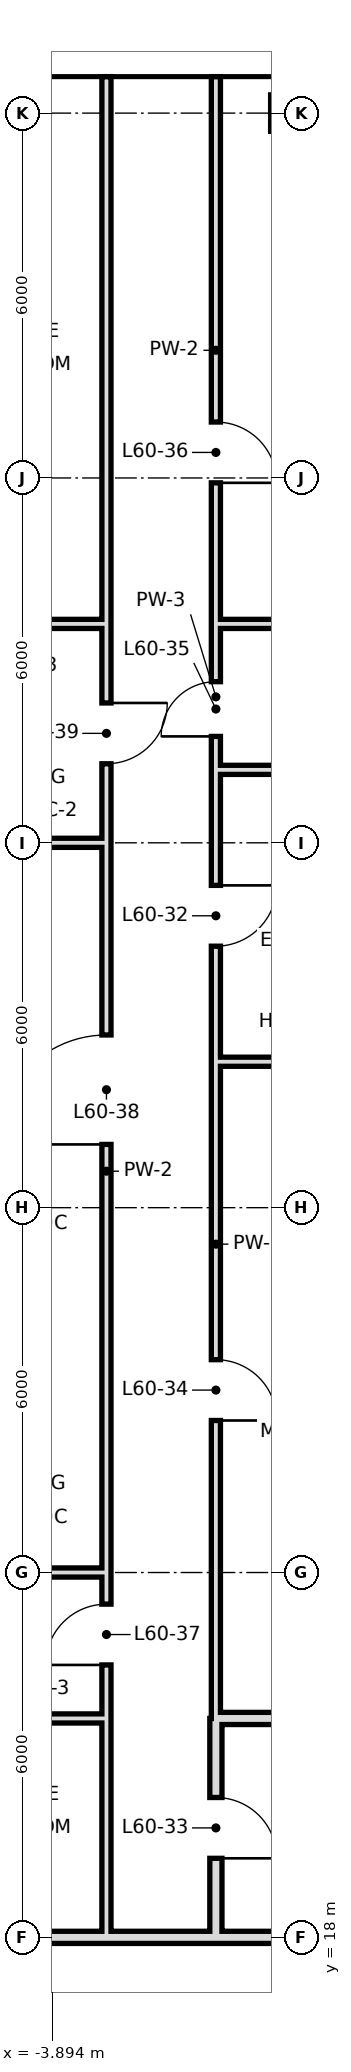
"""IFC4 building model, lengths in metres.
Left out: names, types, materials, properties, quantities, classifications, styles, units other than length and angle.
Written with IfcOpenShell. Run it as: python <this file> out.ifc"""

import sys

from ifc_helpers import new_model, si_unit, direction, frame, frame_2d, origin, place, context, subcontext, project, spatial, rectangle, extrude, element, fill, save


model = new_model("IFC4")
c1 = context("Model", 3, precision=1e-05, world=origin(), true_north=direction((0.0, 1.0)))
c2 = subcontext(c1, "Body", "Model", "MODEL_VIEW")
j1 = project(units=[si_unit("LENGTHUNIT", "METRE"), si_unit("PLANEANGLEUNIT", "RADIAN")], contexts=[c1])
p1 = place(None, origin())
s1 = spatial("IfcSite", under=j1, at=p1, CompositionType="ELEMENT")
p2 = place(p1, origin())
s2 = spatial("IfcBuilding", under=s1, at=p2, CompositionType="ELEMENT")
p3 = place(p2, frame((0.0, 0.0, 254.0)))
s3 = spatial("IfcBuildingStorey", under=s2, at=p3, CompositionType="ELEMENT", Elevation=254.0)
p4 = place(p3, frame((-1.2, 18.0, 0.0), z_axis=(0.0, 0.0, 1.0), x_axis=(0.0, 1.0, 0.0)))
e1 = element("IfcWall", 1, at=p4, inside=s3, PredefinedType="SOLIDWALL", context=c2, shape_type="SweptSolid", body=[
    extrude(rectangle(XDim=3.6, YDim=0.2, at=frame_2d((1.8, 0.0))), origin(), (0.0, 0.0, 1.0), 2.68),
])
p5 = place(p4, frame((1.3, 0.0, 0.0)))
e2 = element("IfcOpeningElement", 2, at=p5, cuts=e1, PredefinedType="OPENING", context=c2, shape_type="SweptSolid", body=[
    extrude(rectangle(XDim=1.0, YDim=2.4, at=frame_2d((0.5, 1.2))), frame((0.0, 0.11, 0.0), z_axis=(0.0, -1.0, 0.0), x_axis=(1.0, 0.0, 0.0)), (0.0, 0.0, 1.0), 0.22),
])
p6 = place(p3, frame((-1.2, 21.6, 0.0), z_axis=(0.0, 0.0, 1.0), x_axis=(0.0, 1.0, 0.0)))
e3 = element("IfcWall", 3, at=p6, inside=s3, PredefinedType="PARTITIONING", context=c2, shape_type="SweptSolid", body=[
    extrude(rectangle(XDim=15.6, YDim=0.15, at=frame_2d((7.8, 0.0))), origin(), (0.0, 0.0, 1.0), 3.38),
])
p7 = place(p6, frame((12.7, 0.0, 0.0)))
e4 = element("IfcOpeningElement", 4, at=p7, cuts=e3, PredefinedType="OPENING", context=c2, shape_type="SweptSolid", body=[
    extrude(rectangle(XDim=1.0, YDim=2.4, at=frame_2d((0.5, 1.2))), frame((0.0, 0.085, 0.0), z_axis=(0.0, -1.0, 0.0), x_axis=(1.0, 0.0, 0.0)), (0.0, 0.0, 1.0), 0.17),
])
p8 = place(p6, frame((4.9, 0.0, 0.0)))
e5 = element("IfcOpeningElement", 5, at=p8, cuts=e3, PredefinedType="OPENING", context=c2, shape_type="SweptSolid", body=[
    extrude(rectangle(XDim=1.0, YDim=2.4, at=frame_2d((0.5, 1.2))), frame((0.0, 0.085, 0.0), z_axis=(0.0, -1.0, 0.0), x_axis=(1.0, 0.0, 0.0)), (0.0, 0.0, 1.0), 0.17),
])
p9 = place(p3, frame((-1.2, 39.6, 0.0), z_axis=(0.0, 0.0, 1.0), x_axis=(0.0, 1.0, 0.0)))
e6 = element("IfcWall", 6, at=p9, inside=s3, PredefinedType="PARTITIONING", context=c2, shape_type="SweptSolid", body=[
    extrude(rectangle(XDim=9.0, YDim=0.15, at=frame_2d((4.5, 0.0))), origin(), (0.0, 0.0, 1.0), 3.38),
])
p10 = place(p9, frame((2.32, 0.0, 0.0)))
e7 = element("IfcOpeningElement", 7, at=p10, cuts=e6, PredefinedType="OPENING", context=c2, shape_type="SweptSolid", body=[
    extrude(rectangle(XDim=1.0, YDim=2.4, at=frame_2d((0.5, 1.2))), frame((0.0, 0.085, 0.0), z_axis=(0.0, -1.0, 0.0), x_axis=(1.0, 0.0, 0.0)), (0.0, 0.0, 1.0), 0.17),
])
p11 = place(p3, frame((-1.2, 37.2, 0.0), z_axis=(0.0, 0.0, 1.0), x_axis=(0.0, 1.0, 0.0)))
e8 = element("IfcWall", 8, at=p11, inside=s3, PredefinedType="PARTITIONING", context=c2, shape_type="SweptSolid", body=[
    extrude(rectangle(XDim=2.4, YDim=0.15, at=frame_2d((1.2, 0.0))), origin(), (0.0, 0.0, 1.0), 3.38),
])
p12 = place(p11, frame((0.55, 0.0, 0.0)))
e9 = element("IfcOpeningElement", 9, at=p12, cuts=e8, PredefinedType="OPENING", context=c2, shape_type="SweptSolid", body=[
    extrude(rectangle(XDim=0.9, YDim=2.4, at=frame_2d((0.45, 1.2))), frame((0.0, 0.085, 0.0), z_axis=(0.0, -1.0, 0.0), x_axis=(1.0, 0.0, 0.0)), (0.0, 0.0, 1.0), 0.17),
])
p13 = place(p3, frame((-3.0, 21.6, 0.0), z_axis=(0.0, 0.0, 1.0), x_axis=(0.0, 1.0, 0.0)))
e10 = element("IfcWall", 10, at=p13, inside=s3, PredefinedType="PARTITIONING", context=c2, shape_type="SweptSolid", body=[
    extrude(rectangle(XDim=18.0, YDim=0.15, at=frame_2d((9.0, 0.0))), origin(), (0.0, 0.0, 1.0), 3.38),
])
p14 = place(p13, frame((0.88, 0.0, 0.0)))
e11 = element("IfcOpeningElement", 11, at=p14, cuts=e10, PredefinedType="OPENING", context=c2, shape_type="SweptSolid", body=[
    extrude(rectangle(XDim=1.0, YDim=2.4, at=frame_2d((0.5, 1.2))), frame((0.0, 0.085, 0.0), z_axis=(0.0, -1.0, 0.0), x_axis=(1.0, 0.0, 0.0)), (0.0, 0.0, 1.0), 0.17),
])
p15 = place(p13, frame((9.44, 0.0, 0.0)))
e12 = element("IfcOpeningElement", 12, at=p15, cuts=e10, PredefinedType="OPENING", context=c2, shape_type="SweptSolid", body=[
    extrude(rectangle(XDim=1.8, YDim=2.4, at=frame_2d((0.9, 1.2))), frame((0.0, 0.085, 0.0), z_axis=(0.0, -1.0, 0.0), x_axis=(1.0, 0.0, 0.0)), (0.0, 0.0, 1.0), 0.17),
])
p16 = place(p13, frame((15.7, 0.0, 0.0)))
e13 = element("IfcOpeningElement", 13, at=p16, cuts=e10, PredefinedType="OPENING", context=c2, shape_type="SweptSolid", body=[
    extrude(rectangle(XDim=1.0, YDim=2.4, at=frame_2d((0.5, 1.2))), frame((0.0, 0.085, 0.0), z_axis=(0.0, -1.0, 0.0), x_axis=(1.0, 0.0, 0.0)), (0.0, 0.0, 1.0), 0.17),
])
p17 = place(p3, frame((-3.0, 18.0, 0.0), z_axis=(0.0, 0.0, 1.0), x_axis=(0.0, 1.0, 0.0)))
e14 = element("IfcWall", 14, at=p17, inside=s3, PredefinedType="PARTITIONING", context=c2, shape_type="SweptSolid", body=[
    extrude(rectangle(XDim=3.6, YDim=0.15, at=frame_2d((1.8, 0.0))), origin(), (0.0, 0.0, 1.0), 3.38),
])
p18 = place(p3, frame((-3.0, 39.6, 0.0), z_axis=(0.0, 0.0, 1.0), x_axis=(0.0, 1.0, 0.0)))
e15 = element("IfcWall", 15, at=p18, inside=s3, PredefinedType="PARTITIONING", context=c2, shape_type="SweptSolid", body=[
    extrude(rectangle(XDim=9.0, YDim=0.15, at=frame_2d((4.5, 0.0))), origin(), (0.0, 0.0, 1.0), 3.38),
])
p19 = place(p3, frame((-1.2, 18.0, 0.0), z_axis=(0.0, 0.0, 1.0), x_axis=(1.0, 0.0, 0.0)))
e16 = element("IfcWall", 16, at=p19, inside=s3, PredefinedType="SOLIDWALL", context=c2, shape_type="SweptSolid", body=[
    extrude(rectangle(XDim=4.3, YDim=0.2, at=frame_2d((2.15, 0.0))), origin(), (0.0, 0.0, 1.0), 2.68),
])
p20 = place(p3, frame((-12.6, 18.0, 0.0), z_axis=(0.0, 0.0, 1.0), x_axis=(1.0, 0.0, 0.0)))
e17 = element("IfcWall", 17, at=p20, inside=s3, PredefinedType="SOLIDWALL", context=c2, shape_type="SweptSolid", body=[
    extrude(rectangle(XDim=11.4, YDim=0.2, at=frame_2d((5.7, 0.0))), origin(), (0.0, 0.0, 1.0), 2.68),
])
p21 = place(p3, frame((-1.2, 21.6, 0.0), z_axis=(0.0, 0.0, 1.0), x_axis=(1.0, 0.0, 0.0)))
e18 = element("IfcWall", 18, at=p21, inside=s3, PredefinedType="SOLIDWALL", context=c2, shape_type="SweptSolid", body=[
    extrude(rectangle(XDim=4.3, YDim=0.2, at=frame_2d((2.15, 0.0))), origin(), (0.0, 0.0, 1.0), 2.68),
])
p22 = place(p3, frame((-6.0, 21.6, 0.0), z_axis=(0.0, 0.0, 1.0), x_axis=(1.0, 0.0, 0.0)))
e19 = element("IfcWall", 19, at=p22, inside=s3, PredefinedType="PARTITIONING", context=c2, shape_type="SweptSolid", body=[
    extrude(rectangle(XDim=3.0, YDim=0.15, at=frame_2d((1.5, 0.0))), origin(), (0.0, 0.0, 1.0), 3.38),
])
p23 = place(p3, frame((-12.0, 24.0, 0.0), z_axis=(0.0, 0.0, 1.0), x_axis=(1.0, 0.0, 0.0)))
e20 = element("IfcWall", 20, at=p23, inside=s3, PredefinedType="PARTITIONING", context=c2, shape_type="SweptSolid", body=[
    extrude(rectangle(XDim=9.0, YDim=0.15, at=frame_2d((4.5, 0.0))), origin(), (0.0, 0.0, 1.0), 2.68),
])
p24 = place(p3, frame((-1.2, 32.4, 0.0), z_axis=(0.0, 0.0, 1.0), x_axis=(1.0, 0.0, 0.0)))
e21 = element("IfcWall", 21, at=p24, inside=s3, PredefinedType="PARTITIONING", context=c2, shape_type="SweptSolid", body=[
    extrude(rectangle(XDim=4.3, YDim=0.15, at=frame_2d((2.15, 0.0))), origin(), (0.0, 0.0, 1.0), 3.38),
])
p25 = place(p3, frame((-12.0, 36.0, 0.0), z_axis=(0.0, 0.0, 1.0), x_axis=(1.0, 0.0, 0.0)))
e22 = element("IfcWall", 22, at=p25, inside=s3, PredefinedType="PARTITIONING", context=c2, shape_type="SweptSolid", body=[
    extrude(rectangle(XDim=9.0, YDim=0.15, at=frame_2d((4.5, 0.0))), origin(), (0.0, 0.0, 1.0), 2.68),
])
p26 = place(p3, frame((-1.2, 37.2, 0.0), z_axis=(0.0, 0.0, 1.0), x_axis=(1.0, 0.0, 0.0)))
e23 = element("IfcWall", 23, at=p26, inside=s3, PredefinedType="PARTITIONING", context=c2, shape_type="SweptSolid", body=[
    extrude(rectangle(XDim=4.3, YDim=0.15, at=frame_2d((2.15, 0.0))), origin(), (0.0, 0.0, 1.0), 3.38),
])
p27 = place(p3, frame((-6.0, 39.6, 0.0), z_axis=(0.0, 0.0, 1.0), x_axis=(1.0, 0.0, 0.0)))
e24 = element("IfcWall", 24, at=p27, inside=s3, PredefinedType="PARTITIONING", context=c2, shape_type="SweptSolid", body=[
    extrude(rectangle(XDim=3.0, YDim=0.15, at=frame_2d((1.5, 0.0))), origin(), (0.0, 0.0, 1.0), 3.38),
])
p28 = place(p3, frame((-1.2, 39.6, 0.0), z_axis=(0.0, 0.0, 1.0), x_axis=(1.0, 0.0, 0.0)))
e25 = element("IfcWall", 25, at=p28, inside=s3, PredefinedType="PARTITIONING", context=c2, shape_type="SweptSolid", body=[
    extrude(rectangle(XDim=4.3, YDim=0.15, at=frame_2d((2.15, 0.0))), origin(), (0.0, 0.0, 1.0), 3.38),
])
p29 = place(p7, origin())
e26 = element("IfcDoor", 26, at=p29, inside=s3, OperationType="SINGLE_SWING_RIGHT", PredefinedType="DOOR", context=c2, shape_type="SweptSolid", body=[
    extrude(rectangle(XDim=1.0, YDim=2.4, at=frame_2d((0.5, 1.2))), frame((0.0, 0.025, 0.0), z_axis=(0.0, -1.0, 0.0), x_axis=(1.0, 0.0, 0.0)), (0.0, 0.0, 1.0), 0.05),
])
fill(e4, e26)
p30 = place(p5, frame((1.0, 0.0, 0.0), z_axis=(0.0, 0.0, 1.0), x_axis=(-1.0, 0.0, 0.0)))
e27 = element("IfcDoor", 27, at=p30, inside=s3, OperationType="SINGLE_SWING_RIGHT", PredefinedType="DOOR", context=c2, shape_type="SweptSolid", body=[
    extrude(rectangle(XDim=1.0, YDim=2.4, at=frame_2d((0.5, 1.2))), frame((0.0, 0.025, 0.0), z_axis=(0.0, -1.0, 0.0), x_axis=(1.0, 0.0, 0.0)), (0.0, 0.0, 1.0), 0.05),
])
fill(e2, e27)
p31 = place(p8, frame((1.0, 0.0, 0.0), z_axis=(0.0, 0.0, 1.0), x_axis=(-1.0, 0.0, 0.0)))
e28 = element("IfcDoor", 28, at=p31, inside=s3, OperationType="SINGLE_SWING_RIGHT", PredefinedType="DOOR", context=c2, shape_type="SweptSolid", body=[
    extrude(rectangle(XDim=1.0, YDim=2.4, at=frame_2d((0.5, 1.2))), frame((0.0, 0.025, 0.0), z_axis=(0.0, -1.0, 0.0), x_axis=(1.0, 0.0, 0.0)), (0.0, 0.0, 1.0), 0.05),
])
fill(e5, e28)
p32 = place(p12, origin())
e29 = element("IfcDoor", 29, at=p32, inside=s3, OperationType="SINGLE_SWING_LEFT", PredefinedType="DOOR", context=c2, shape_type="SweptSolid", body=[
    extrude(rectangle(XDim=0.9, YDim=2.4, at=frame_2d((0.45, 1.2))), frame((0.0, 0.025, 0.0), z_axis=(0.0, -1.0, 0.0), x_axis=(1.0, 0.0, 0.0)), (0.0, 0.0, 1.0), 0.05),
])
fill(e9, e29)
p33 = place(p10, frame((1.0, 0.0, 0.0), z_axis=(0.0, 0.0, 1.0), x_axis=(-1.0, 0.0, 0.0)))
e30 = element("IfcDoor", 30, at=p33, inside=s3, OperationType="SINGLE_SWING_RIGHT", PredefinedType="DOOR", context=c2, shape_type="SweptSolid", body=[
    extrude(rectangle(XDim=1.0, YDim=2.4, at=frame_2d((0.5, 1.2))), frame((0.0, 0.025, 0.0), z_axis=(0.0, -1.0, 0.0), x_axis=(1.0, 0.0, 0.0)), (0.0, 0.0, 1.0), 0.05),
])
fill(e7, e30)
p34 = place(p14, origin())
e31 = element("IfcDoor", 31, at=p34, inside=s3, OperationType="SINGLE_SWING_LEFT", PredefinedType="DOOR", context=c2, shape_type="SweptSolid", body=[
    extrude(rectangle(XDim=1.0, YDim=2.4, at=frame_2d((0.5, 1.2))), frame((0.0, 0.025, 0.0), z_axis=(0.0, -1.0, 0.0), x_axis=(1.0, 0.0, 0.0)), (0.0, 0.0, 1.0), 0.05),
])
fill(e11, e31)
p35 = place(p15, origin())
e32 = element("IfcDoor", 32, at=p35, inside=s3, OperationType="SINGLE_SWING_LEFT", PredefinedType="DOOR", context=c2, shape_type="SweptSolid", body=[
    extrude(rectangle(XDim=1.8, YDim=2.4, at=frame_2d((0.9, 1.2))), frame((0.0, 0.025, 0.0), z_axis=(0.0, -1.0, 0.0), x_axis=(1.0, 0.0, 0.0)), (0.0, 0.0, 1.0), 0.05),
])
fill(e12, e32)
p36 = place(p16, origin())
e33 = element("IfcDoor", 33, at=p36, inside=s3, OperationType="SINGLE_SWING_RIGHT", PredefinedType="DOOR", context=c2, shape_type="SweptSolid", body=[
    extrude(rectangle(XDim=1.0, YDim=2.4, at=frame_2d((0.5, 1.2))), frame((0.0, 0.025, 0.0), z_axis=(0.0, -1.0, 0.0), x_axis=(1.0, 0.0, 0.0)), (0.0, 0.0, 1.0), 0.05),
])
fill(e13, e33)
save(model, sys.argv[1])
